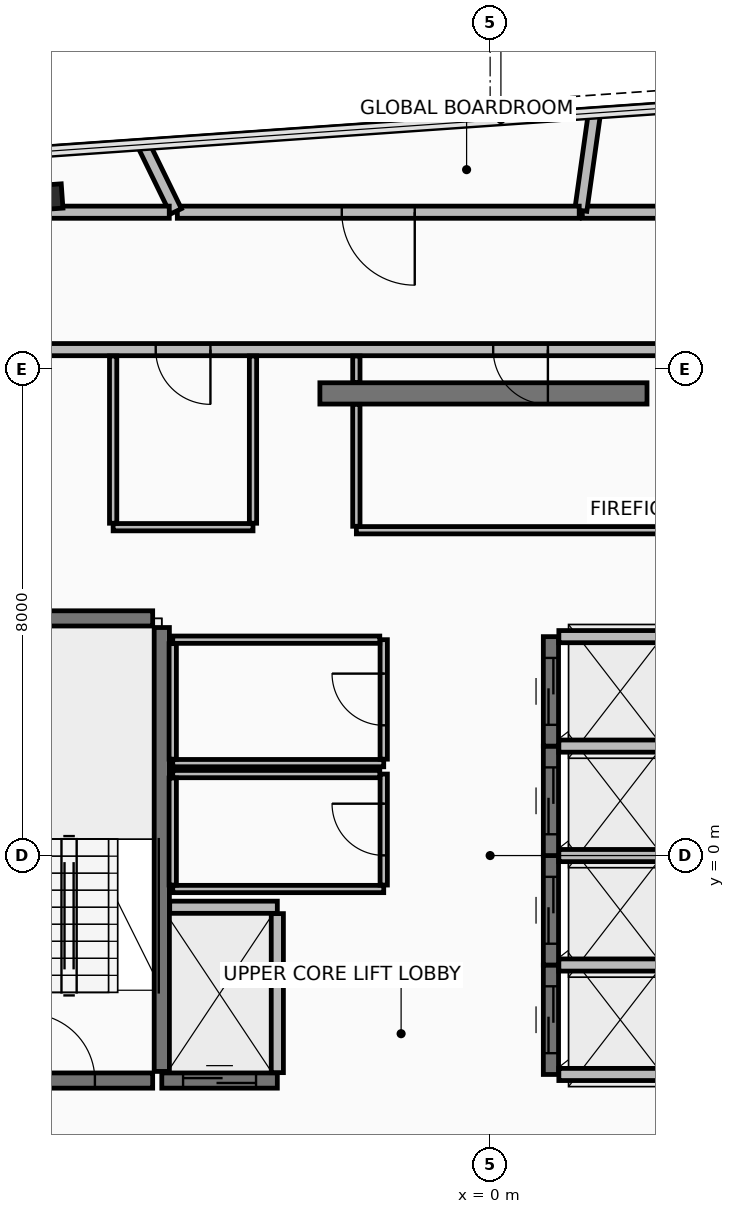
"""IFC4 building model, lengths in metres.
Left out: names, types, materials, properties, quantities, classifications, styles, units other than length and angle.
Written with IfcOpenShell. Run it as: python <this file> out.ifc"""

import sys

from ifc_helpers import new_model, si_unit, direction, frame, frame_2d, origin, origin_2d, place, context, subcontext, project, spatial, rectangle, hollow_rectangle, extrude, element, fill, save


model = new_model("IFC4")
c1 = context("Model", 3, precision=1e-05, world=origin(), true_north=direction((0.0, 1.0)))
c2 = subcontext(c1, "Body", "Model", "MODEL_VIEW")
j1 = project(units=[si_unit("LENGTHUNIT", "METRE"), si_unit("PLANEANGLEUNIT", "RADIAN")], contexts=[c1])
p1 = place(None, origin())
s1 = spatial("IfcSite", under=j1, at=p1, CompositionType="ELEMENT")
p2 = place(p1, origin())
s2 = spatial("IfcBuilding", under=s1, at=p2, CompositionType="ELEMENT")
p3 = place(p2, frame((0.0, 0.0, 260.6)))
s3 = spatial("IfcBuildingStorey", under=s2, at=p3, CompositionType="ELEMENT", Elevation=260.6)
p4 = place(p3, frame((-7.24, 10.833, 0.0), z_axis=(0.0, 0.0, 1.0), x_axis=(0.99756392851, 0.069758214822, 0.0)))
e1 = element("IfcColumn", 1, at=p4, inside=s3, PredefinedType="COLUMN", context=c2, shape_type="SweptSolid", body=[
    extrude(hollow_rectangle(XDim=0.4, YDim=0.4, WallThickness=0.025, at=origin_2d()), origin(), (0.0, 0.0, 1.0), 3.6),
])
p5 = place(p3, frame((-2.8, 7.6, 0.0), z_axis=(0.0, 0.0, 1.0), x_axis=(1.0, 0.0, 0.0)))
e2 = element("IfcWall", 2, at=p5, inside=s3, PredefinedType="SHEAR", context=c2, shape_type="SweptSolid", body=[
    extrude(rectangle(XDim=5.38, YDim=0.35, at=frame_2d((2.69, 0.0))), origin(), (0.0, 0.0, 1.0), 3.42),
])
p6 = place(p3, frame((9.62, 8.32, 0.0), z_axis=(0.0, 0.0, 1.0), x_axis=(-1.0, 0.0, 0.0)))
e3 = element("IfcWall", 3, at=p6, inside=s3, PredefinedType="PARTITIONING", context=c2, shape_type="SweptSolid", body=[
    extrude(rectangle(XDim=19.24, YDim=0.2, at=frame_2d((9.62, 0.0))), origin(), (0.0, 0.0, 1.0), 2.915),
])
p7 = place(p6, frame((8.67, 0.0, 0.0)))
e4 = element("IfcOpeningElement", 4, at=p7, cuts=e3, PredefinedType="OPENING", context=c2, shape_type="SweptSolid", body=[
    extrude(rectangle(XDim=0.9, YDim=2.1, at=frame_2d((0.45, 1.05))), frame((0.0, 0.11, 0.0), z_axis=(0.0, -1.0, 0.0), x_axis=(1.0, 0.0, 0.0)), (0.0, 0.0, 1.0), 0.22),
])
p8 = place(p6, frame((14.22, 0.0, 0.0)))
e5 = element("IfcOpeningElement", 5, at=p8, cuts=e3, PredefinedType="OPENING", context=c2, shape_type="SweptSolid", body=[
    extrude(rectangle(XDim=0.9, YDim=2.1, at=frame_2d((0.45, 1.05))), frame((0.0, 0.11, 0.0), z_axis=(0.0, -1.0, 0.0), x_axis=(1.0, 0.0, 0.0)), (0.0, 0.0, 1.0), 0.22),
])
p9 = place(p3, frame((-5.4, -3.55, 0.0), z_axis=(0.0, 0.0, 1.0), x_axis=(0.0, 1.0, 0.0)))
e6 = element("IfcWall", 6, at=p9, inside=s3, PredefinedType="SHEAR", context=c2, shape_type="SweptSolid", body=[
    extrude(rectangle(XDim=7.3, YDim=0.25, at=frame_2d((3.65, 0.0))), origin(), (0.0, 0.0, 1.0), 3.42),
])
p10 = place(p3, frame((-8.5, -3.7, 0.0), z_axis=(0.0, 0.0, 1.0), x_axis=(1.0, 0.0, 0.0)))
e7 = element("IfcWall", 7, at=p10, inside=s3, PredefinedType="SHEAR", context=c2, shape_type="SweptSolid", body=[
    extrude(rectangle(XDim=2.95, YDim=0.25, at=frame_2d((1.475, 0.0))), origin(), (0.0, 0.0, 1.0), 3.42),
])
p11 = place(p10, frame((0.9, 0.0, 0.0)))
e8 = element("IfcOpeningElement", 8, at=p11, cuts=e7, PredefinedType="OPENING", context=c2, shape_type="SweptSolid", body=[
    extrude(rectangle(XDim=1.1, YDim=2.15, at=frame_2d((0.55, 1.075))), frame((0.0, 0.135, 0.0), z_axis=(0.0, -1.0, 0.0), x_axis=(1.0, 0.0, 0.0)), (0.0, 0.0, 1.0), 0.27),
])
p12 = place(p3, frame((-8.5, 3.9, 0.0), z_axis=(0.0, 0.0, 1.0), x_axis=(1.0, 0.0, 0.0)))
e9 = element("IfcWall", 9, at=p12, inside=s3, PredefinedType="SHEAR", context=c2, shape_type="SweptSolid", body=[
    extrude(rectangle(XDim=2.95, YDim=0.25, at=frame_2d((1.475, 0.0))), origin(), (0.0, 0.0, 1.0), 3.42),
])
p13 = place(p3, frame((1.0, -3.6, 0.0), z_axis=(0.0, 0.0, 1.0), x_axis=(0.0, 1.0, 0.0)))
e10 = element("IfcWall", 10, at=p13, inside=s3, PredefinedType="SHEAR", context=c2, shape_type="SweptSolid", body=[
    extrude(rectangle(XDim=1.8, YDim=0.25, at=frame_2d((0.9, 0.0))), origin(), (0.0, 0.0, 1.0), 3.42),
])
p14 = place(p13, frame((0.35, 0.0, 0.0)))
e11 = element("IfcOpeningElement", 11, at=p14, cuts=e10, PredefinedType="OPENING", context=c2, shape_type="SweptSolid", body=[
    extrude(rectangle(XDim=1.1, YDim=2.2, at=frame_2d((0.55, 1.1))), frame((0.0, 0.135, 0.0), z_axis=(0.0, -1.0, 0.0), x_axis=(1.0, 0.0, 0.0)), (0.0, 0.0, 1.0), 0.27),
])
for number, where, z_axis, x_axis in (
    (12, (1.13, -3.6, 0.0), (0.0, 0.0, 1.0), (1.0, 0.0, 0.0)),
    (13, (1.13, -1.8, 0.0), (0.0, 0.0, 1.0), (1.0, 0.0, 0.0)),
):
    element("IfcWall", number, at=place(p3, frame(where, z_axis=z_axis, x_axis=x_axis)), inside=s3, PredefinedType="PARTITIONING", context=c2, shape_type="SweptSolid", body=[
        extrude(rectangle(XDim=2.045, YDim=0.2, at=frame_2d((1.022, 0.0))), origin(), (0.0, 0.0, 1.0), 3.42),
    ])
p15 = place(p3, frame((1.0, -1.8, 0.0), z_axis=(0.0, 0.0, 1.0), x_axis=(0.0, 1.0, 0.0)))
e14 = element("IfcWall", 14, at=p15, inside=s3, PredefinedType="SHEAR", context=c2, shape_type="SweptSolid", body=[
    extrude(rectangle(XDim=1.8, YDim=0.25, at=frame_2d((0.9, 0.0))), origin(), (0.0, 0.0, 1.0), 3.42),
])
p16 = place(p15, frame((0.35, 0.0, 0.0)))
e15 = element("IfcOpeningElement", 15, at=p16, cuts=e14, PredefinedType="OPENING", context=c2, shape_type="SweptSolid", body=[
    extrude(rectangle(XDim=1.1, YDim=2.2, at=frame_2d((0.55, 1.1))), frame((0.0, 0.135, 0.0), z_axis=(0.0, -1.0, 0.0), x_axis=(1.0, 0.0, 0.0)), (0.0, 0.0, 1.0), 0.27),
])
p17 = place(p3, frame((1.13, 0.0, 0.0), z_axis=(0.0, 0.0, 1.0), x_axis=(1.0, 0.0, 0.0)))
e16 = element("IfcWall", 16, at=p17, inside=s3, PredefinedType="PARTITIONING", context=c2, shape_type="SweptSolid", body=[
    extrude(rectangle(XDim=2.045, YDim=0.2, at=frame_2d((1.022, 0.0))), origin(), (0.0, 0.0, 1.0), 3.42),
])
p18 = place(p3, frame((1.0, 0.0, 0.0), z_axis=(0.0, 0.0, 1.0), x_axis=(0.0, 1.0, 0.0)))
e17 = element("IfcWall", 17, at=p18, inside=s3, PredefinedType="SHEAR", context=c2, shape_type="SweptSolid", body=[
    extrude(rectangle(XDim=1.8, YDim=0.25, at=frame_2d((0.9, 0.0))), origin(), (0.0, 0.0, 1.0), 3.42),
])
p19 = place(p18, frame((0.35, 0.0, 0.0)))
e18 = element("IfcOpeningElement", 18, at=p19, cuts=e17, PredefinedType="OPENING", context=c2, shape_type="SweptSolid", body=[
    extrude(rectangle(XDim=1.1, YDim=2.2, at=frame_2d((0.55, 1.1))), frame((0.0, 0.135, 0.0), z_axis=(0.0, -1.0, 0.0), x_axis=(1.0, 0.0, 0.0)), (0.0, 0.0, 1.0), 0.27),
])
p20 = place(p3, frame((1.13, 1.8, 0.0), z_axis=(0.0, 0.0, 1.0), x_axis=(1.0, 0.0, 0.0)))
e19 = element("IfcWall", 19, at=p20, inside=s3, PredefinedType="PARTITIONING", context=c2, shape_type="SweptSolid", body=[
    extrude(rectangle(XDim=2.045, YDim=0.2, at=frame_2d((1.022, 0.0))), origin(), (0.0, 0.0, 1.0), 3.42),
])
p21 = place(p3, frame((1.0, 1.8, 0.0), z_axis=(0.0, 0.0, 1.0), x_axis=(0.0, 1.0, 0.0)))
e20 = element("IfcWall", 20, at=p21, inside=s3, PredefinedType="SHEAR", context=c2, shape_type="SweptSolid", body=[
    extrude(rectangle(XDim=1.8, YDim=0.25, at=frame_2d((0.9, 0.0))), origin(), (0.0, 0.0, 1.0), 3.42),
])
p22 = place(p21, frame((0.35, 0.0, 0.0)))
e21 = element("IfcOpeningElement", 21, at=p22, cuts=e20, PredefinedType="OPENING", context=c2, shape_type="SweptSolid", body=[
    extrude(rectangle(XDim=1.1, YDim=2.2, at=frame_2d((0.55, 1.1))), frame((0.0, 0.135, 0.0), z_axis=(0.0, -1.0, 0.0), x_axis=(1.0, 0.0, 0.0)), (0.0, 0.0, 1.0), 0.27),
])
p23 = place(p3, frame((1.13, 3.6, 0.0), z_axis=(0.0, 0.0, 1.0), x_axis=(1.0, 0.0, 0.0)))
e22 = element("IfcWall", 22, at=p23, inside=s3, PredefinedType="PARTITIONING", context=c2, shape_type="SweptSolid", body=[
    extrude(rectangle(XDim=2.045, YDim=0.2, at=frame_2d((1.022, 0.0))), origin(), (0.0, 0.0, 1.0), 2.715),
])
p24 = place(p3, frame((-5.4, -3.7, 0.0), z_axis=(0.0, 0.0, 1.0), x_axis=(1.0, 0.0, 0.0)))
e23 = element("IfcWall", 23, at=p24, inside=s3, PredefinedType="SHEAR", context=c2, shape_type="SweptSolid", body=[
    extrude(rectangle(XDim=1.9, YDim=0.25, at=frame_2d((0.95, 0.0))), origin(), (0.0, 0.0, 1.0), 3.42),
])
p25 = place(p24, frame((0.35, 0.0, 0.0)))
e24 = element("IfcOpeningElement", 24, at=p25, cuts=e23, PredefinedType="OPENING", context=c2, shape_type="SweptSolid", body=[
    extrude(rectangle(XDim=1.2, YDim=2.2, at=frame_2d((0.6, 1.1))), frame((0.0, 0.135, 0.0), z_axis=(0.0, -1.0, 0.0), x_axis=(1.0, 0.0, 0.0)), (0.0, 0.0, 1.0), 0.27),
])
p26 = place(p3, frame((-5.27, -0.85, 0.0), z_axis=(0.0, 0.0, 1.0), x_axis=(1.0, 0.0, 0.0)))
e25 = element("IfcWall", 25, at=p26, inside=s3, PredefinedType="PARTITIONING", context=c2, shape_type="SweptSolid", body=[
    extrude(rectangle(XDim=1.77, YDim=0.2, at=frame_2d((0.885, 0.0))), origin(), (0.0, 0.0, 1.0), 3.42),
])
p27 = place(p3, frame((-3.5, -3.57, 0.0), z_axis=(0.0, 0.0, 1.0), x_axis=(0.0, 1.0, 0.0)))
e26 = element("IfcWall", 26, at=p27, inside=s3, PredefinedType="PARTITIONING", context=c2, shape_type="SweptSolid", body=[
    extrude(rectangle(XDim=2.615, YDim=0.2, at=frame_2d((1.308, 0.0))), origin(), (0.0, 0.0, 1.0), 3.42),
])
p28 = place(p3, frame((-5.22, 1.52, 0.0), z_axis=(0.0, 0.0, 1.0), x_axis=(1.0, 0.0, 0.0)))
e27 = element("IfcWall", 27, at=p28, inside=s3, PredefinedType="PARTITIONING", context=c2, shape_type="SweptSolid", body=[
    extrude(rectangle(XDim=3.47, YDim=0.12, at=frame_2d((1.735, 0.0))), origin(), (0.0, 0.0, 1.0), 3.42),
])
p29 = place(p3, frame((-1.75, 1.585, 0.0), z_axis=(0.0, 0.0, 1.0), x_axis=(0.0, 1.0, 0.0)))
e28 = element("IfcWall", 28, at=p29, inside=s3, PredefinedType="PARTITIONING", context=c2, shape_type="SweptSolid", body=[
    extrude(rectangle(XDim=1.965, YDim=0.12, at=frame_2d((0.982, 0.0))), origin(), (0.0, 0.0, 1.0), 3.42),
])
p30 = place(p29, frame((0.557, 0.0, 0.0)))
e29 = element("IfcOpeningElement", 29, at=p30, cuts=e28, PredefinedType="OPENING", context=c2, shape_type="SweptSolid", body=[
    extrude(rectangle(XDim=0.85, YDim=2.1, at=frame_2d((0.425, 1.05))), frame((0.0, 0.07, 0.0), z_axis=(0.0, -1.0, 0.0), x_axis=(1.0, 0.0, 0.0)), (0.0, 0.0, 1.0), 0.14),
])
p31 = place(p3, frame((-1.815, 3.55, 0.0), z_axis=(0.0, 0.0, 1.0), x_axis=(-1.0, 0.0, 0.0)))
e30 = element("IfcWall", 30, at=p31, inside=s3, PredefinedType="PARTITIONING", context=c2, shape_type="SweptSolid", body=[
    extrude(rectangle(XDim=3.405, YDim=0.12, at=frame_2d((1.703, 0.0))), origin(), (0.0, 0.0, 1.0), 3.42),
])
p32 = place(p3, frame((-5.22, 3.485, 0.0), z_axis=(0.0, 0.0, 1.0), x_axis=(0.0, -1.0, 0.0)))
e31 = element("IfcWall", 31, at=p32, inside=s3, PredefinedType="PARTITIONING", context=c2, shape_type="SweptSolid", body=[
    extrude(rectangle(XDim=1.9, YDim=0.12, at=frame_2d((0.95, 0.0))), origin(), (0.0, 0.0, 1.0), 3.42),
])
p33 = place(p3, frame((-5.22, -0.55, 0.0), z_axis=(0.0, 0.0, 1.0), x_axis=(1.0, 0.0, 0.0)))
e32 = element("IfcWall", 32, at=p33, inside=s3, PredefinedType="PARTITIONING", context=c2, shape_type="SweptSolid", body=[
    extrude(rectangle(XDim=3.47, YDim=0.12, at=frame_2d((1.735, 0.0))), origin(), (0.0, 0.0, 1.0), 3.42),
])
p34 = place(p3, frame((-1.75, -0.485, 0.0), z_axis=(0.0, 0.0, 1.0), x_axis=(0.0, 1.0, 0.0)))
e33 = element("IfcWall", 33, at=p34, inside=s3, PredefinedType="PARTITIONING", context=c2, shape_type="SweptSolid", body=[
    extrude(rectangle(XDim=1.825, YDim=0.12, at=frame_2d((0.913, 0.0))), origin(), (0.0, 0.0, 1.0), 3.42),
])
p35 = place(p34, frame((0.488, 0.0, 0.0)))
e34 = element("IfcOpeningElement", 34, at=p35, cuts=e33, PredefinedType="OPENING", context=c2, shape_type="SweptSolid", body=[
    extrude(rectangle(XDim=0.85, YDim=2.1, at=frame_2d((0.425, 1.05))), frame((0.0, 0.07, 0.0), z_axis=(0.0, -1.0, 0.0), x_axis=(1.0, 0.0, 0.0)), (0.0, 0.0, 1.0), 0.14),
])
p36 = place(p3, frame((-1.815, 1.34, 0.0), z_axis=(0.0, 0.0, 1.0), x_axis=(-1.0, 0.0, 0.0)))
e35 = element("IfcWall", 35, at=p36, inside=s3, PredefinedType="PARTITIONING", context=c2, shape_type="SweptSolid", body=[
    extrude(rectangle(XDim=3.405, YDim=0.12, at=frame_2d((1.703, 0.0))), origin(), (0.0, 0.0, 1.0), 3.42),
])
p37 = place(p3, frame((-5.22, 1.275, 0.0), z_axis=(0.0, 0.0, 1.0), x_axis=(0.0, -1.0, 0.0)))
e36 = element("IfcWall", 36, at=p37, inside=s3, PredefinedType="PARTITIONING", context=c2, shape_type="SweptSolid", body=[
    extrude(rectangle(XDim=1.76, YDim=0.12, at=frame_2d((0.88, 0.0))), origin(), (0.0, 0.0, 1.0), 3.42),
])
p38 = place(p3, frame((-2.2, 5.35, 0.0), z_axis=(0.0, 0.0, 1.0), x_axis=(1.0, 0.0, 0.0)))
e37 = element("IfcWall", 37, at=p38, inside=s3, PredefinedType="PARTITIONING", context=c2, shape_type="SweptSolid", body=[
    extrude(rectangle(XDim=5.4, YDim=0.12, at=frame_2d((2.7, 0.0))), origin(), (0.0, 0.0, 1.0), 2.715),
])
p39 = place(p3, frame((-2.2, 8.215, 0.0), z_axis=(0.0, 0.0, 1.0), x_axis=(0.0, -1.0, 0.0)))
e38 = element("IfcWall", 38, at=p39, inside=s3, PredefinedType="PARTITIONING", context=c2, shape_type="SweptSolid", body=[
    extrude(rectangle(XDim=0.435, YDim=0.12, at=frame_2d((0.218, 0.0))), origin(), (0.0, 0.0, 1.0), 2.715),
])
p40 = place(p3, frame((-2.2, 7.42, 0.0), z_axis=(0.0, 0.0, 1.0), x_axis=(0.0, -1.0, 0.0)))
e39 = element("IfcWall", 39, at=p40, inside=s3, PredefinedType="PARTITIONING", context=c2, shape_type="SweptSolid", body=[
    extrude(rectangle(XDim=2.005, YDim=0.12, at=frame_2d((1.002, 0.0))), origin(), (0.0, 0.0, 1.0), 2.715),
])
p41 = place(p3, frame((-6.2, 5.4, 0.0), z_axis=(0.0, 0.0, 1.0), x_axis=(1.0, 0.0, 0.0)))
e40 = element("IfcWall", 40, at=p41, inside=s3, PredefinedType="PARTITIONING", context=c2, shape_type="SweptSolid", body=[
    extrude(rectangle(XDim=2.3, YDim=0.12, at=frame_2d((1.15, 0.0))), origin(), (0.0, 0.0, 1.0), 3.42),
])
for number, where, z_axis, x_axis in (
    (41, (-3.9, 5.465, 0.0), (0.0, 0.0, 1.0), (0.0, 1.0, 0.0)),
    (42, (-6.2, 8.215, 0.0), (0.0, 0.0, 1.0), (0.0, -1.0, 0.0)),
):
    element("IfcWall", number, at=place(p3, frame(where, z_axis=z_axis, x_axis=x_axis)), inside=s3, PredefinedType="PARTITIONING", context=c2, shape_type="SweptSolid", body=[
        extrude(rectangle(XDim=2.75, YDim=0.12, at=frame_2d((1.375, 0.0))), origin(), (0.0, 0.0, 1.0), 2.715),
    ])
p42 = place(p3, frame((7.333, 10.58, 0.0), z_axis=(0.0, 0.0, 1.0), x_axis=(-1.0, 0.0, 0.0)))
e43 = element("IfcWall", 43, at=p42, inside=s3, PredefinedType="PARTITIONING", context=c2, shape_type="SweptSolid", body=[
    extrude(rectangle(XDim=5.817, YDim=0.2, at=frame_2d((2.909, 0.0))), origin(), (0.0, 0.0, 1.0), 3.42),
])
p43 = place(p42, frame((2.409, 0.0, 0.0)))
e44 = element("IfcOpeningElement", 44, at=p43, cuts=e43, PredefinedType="OPENING", context=c2, shape_type="SweptSolid", body=[
    extrude(rectangle(XDim=1.0, YDim=2.15, at=frame_2d((0.5, 1.075))), frame((0.0, 0.11, 0.0), z_axis=(0.0, -1.0, 0.0), x_axis=(1.0, 0.0, 0.0)), (0.0, 0.0, 1.0), 0.22),
])
p44 = place(p3, frame((1.491, 10.608, 0.0), z_axis=(0.0, 0.0, 1.0), x_axis=(0.139154192709, 0.990270725939, 0.0)))
e45 = element("IfcWall", 45, at=p44, inside=s3, PredefinedType="PARTITIONING", context=c2, shape_type="SweptSolid", body=[
    extrude(rectangle(XDim=1.598, YDim=0.2, at=frame_2d((0.799, 0.0))), origin(), (0.0, 0.0, 1.0), 2.765),
])
p45 = place(p3, frame((1.465, 10.58, 0.0), z_axis=(0.0, 0.0, 1.0), x_axis=(-1.0, 0.0, 0.0)))
e46 = element("IfcWall", 46, at=p45, inside=s3, PredefinedType="PARTITIONING", context=c2, shape_type="SweptSolid", body=[
    extrude(rectangle(XDim=6.61, YDim=0.2, at=frame_2d((3.305, 0.0))), origin(), (0.0, 0.0, 1.0), 3.42),
])
p46 = place(p45, frame((2.705, 0.0, 0.0)))
e47 = element("IfcOpeningElement", 47, at=p46, cuts=e46, PredefinedType="OPENING", context=c2, shape_type="SweptSolid", body=[
    extrude(rectangle(XDim=1.2, YDim=2.15, at=frame_2d((0.6, 1.075))), frame((0.0, 0.11, 0.0), z_axis=(0.0, -1.0, 0.0), x_axis=(1.0, 0.0, 0.0)), (0.0, 0.0, 1.0), 0.22),
])
p47 = place(p3, frame((-5.167, 10.594, 0.0), z_axis=(0.0, 0.0, 1.0), x_axis=(-0.438482667622, 0.89873964539, 0.0)))
e48 = element("IfcWall", 48, at=p47, inside=s3, PredefinedType="PARTITIONING", context=c2, shape_type="SweptSolid", body=[
    extrude(rectangle(XDim=1.222, YDim=0.2, at=frame_2d((0.611, 0.0))), origin(), (0.0, 0.0, 1.0), 2.765),
])
p48 = place(p3, frame((-5.277, 10.58, 0.0), z_axis=(0.0, 0.0, 1.0), x_axis=(-1.0, 0.0, 0.0)))
e49 = element("IfcWall", 49, at=p48, inside=s3, PredefinedType="PARTITIONING", context=c2, shape_type="SweptSolid", body=[
    extrude(rectangle(XDim=6.498, YDim=0.2, at=frame_2d((3.249, 0.0))), origin(), (0.0, 0.0, 1.0), 2.765),
])
p49 = place(p48, frame((3.209, 0.0, 0.0)))
e50 = element("IfcOpeningElement", 50, at=p49, cuts=e49, PredefinedType="OPENING", context=c2, shape_type="SweptSolid", body=[
    extrude(rectangle(XDim=1.2, YDim=2.15, at=frame_2d((0.6, 1.075))), frame((0.0, 0.11, 0.0), z_axis=(0.0, -1.0, 0.0), x_axis=(1.0, 0.0, 0.0)), (0.0, 0.0, 1.0), 0.22),
])
p50 = place(p11, origin())
e51 = element("IfcDoor", 51, at=p50, inside=s3, OperationType="SINGLE_SWING_LEFT", PredefinedType="DOOR", context=c2, shape_type="SweptSolid", body=[
    extrude(rectangle(XDim=1.1, YDim=2.15, at=frame_2d((0.55, 1.075))), frame((0.0, 0.025, 0.0), z_axis=(0.0, -1.0, 0.0), x_axis=(1.0, 0.0, 0.0)), (0.0, 0.0, 1.0), 0.05),
])
fill(e8, e51)
p51 = place(p14, origin())
e52 = element("IfcDoor", 52, at=p51, inside=s3, OperationType="SLIDING_TO_LEFT", PredefinedType="DOOR", context=c2, shape_type="SweptSolid", body=[
    extrude(rectangle(XDim=1.1, YDim=2.2, at=frame_2d((0.55, 1.1))), frame((0.0, 0.025, 0.0), z_axis=(0.0, -1.0, 0.0), x_axis=(1.0, 0.0, 0.0)), (0.0, 0.0, 1.0), 0.05),
])
fill(e11, e52)
p52 = place(p16, origin())
e53 = element("IfcDoor", 53, at=p52, inside=s3, OperationType="SLIDING_TO_LEFT", PredefinedType="DOOR", context=c2, shape_type="SweptSolid", body=[
    extrude(rectangle(XDim=1.1, YDim=2.2, at=frame_2d((0.55, 1.1))), frame((0.0, 0.025, 0.0), z_axis=(0.0, -1.0, 0.0), x_axis=(1.0, 0.0, 0.0)), (0.0, 0.0, 1.0), 0.05),
])
fill(e15, e53)
p53 = place(p19, origin())
e54 = element("IfcDoor", 54, at=p53, inside=s3, OperationType="SLIDING_TO_LEFT", PredefinedType="DOOR", context=c2, shape_type="SweptSolid", body=[
    extrude(rectangle(XDim=1.1, YDim=2.2, at=frame_2d((0.55, 1.1))), frame((0.0, 0.025, 0.0), z_axis=(0.0, -1.0, 0.0), x_axis=(1.0, 0.0, 0.0)), (0.0, 0.0, 1.0), 0.05),
])
fill(e18, e54)
p54 = place(p22, origin())
e55 = element("IfcDoor", 55, at=p54, inside=s3, OperationType="SLIDING_TO_LEFT", PredefinedType="DOOR", context=c2, shape_type="SweptSolid", body=[
    extrude(rectangle(XDim=1.1, YDim=2.2, at=frame_2d((0.55, 1.1))), frame((0.0, 0.025, 0.0), z_axis=(0.0, -1.0, 0.0), x_axis=(1.0, 0.0, 0.0)), (0.0, 0.0, 1.0), 0.05),
])
fill(e21, e55)
p55 = place(p25, origin())
e56 = element("IfcDoor", 56, at=p55, inside=s3, OperationType="SLIDING_TO_RIGHT", PredefinedType="DOOR", context=c2, shape_type="SweptSolid", body=[
    extrude(rectangle(XDim=1.2, YDim=2.2, at=frame_2d((0.6, 1.1))), frame((0.0, 0.025, 0.0), z_axis=(0.0, -1.0, 0.0), x_axis=(1.0, 0.0, 0.0)), (0.0, 0.0, 1.0), 0.05),
])
fill(e24, e56)
p56 = place(p30, frame((0.85, 0.0, 0.0), z_axis=(0.0, 0.0, 1.0), x_axis=(-1.0, 0.0, 0.0)))
e57 = element("IfcDoor", 57, at=p56, inside=s3, OperationType="SINGLE_SWING_RIGHT", PredefinedType="DOOR", context=c2, shape_type="SweptSolid", body=[
    extrude(rectangle(XDim=0.85, YDim=2.1, at=frame_2d((0.425, 1.05))), frame((0.0, 0.025, 0.0), z_axis=(0.0, -1.0, 0.0), x_axis=(1.0, 0.0, 0.0)), (0.0, 0.0, 1.0), 0.05),
])
fill(e29, e57)
p57 = place(p35, frame((0.85, 0.0, 0.0), z_axis=(0.0, 0.0, 1.0), x_axis=(-1.0, 0.0, 0.0)))
e58 = element("IfcDoor", 58, at=p57, inside=s3, OperationType="SINGLE_SWING_RIGHT", PredefinedType="DOOR", context=c2, shape_type="SweptSolid", body=[
    extrude(rectangle(XDim=0.85, YDim=2.1, at=frame_2d((0.425, 1.05))), frame((0.0, 0.025, 0.0), z_axis=(0.0, -1.0, 0.0), x_axis=(1.0, 0.0, 0.0)), (0.0, 0.0, 1.0), 0.05),
])
fill(e34, e58)
p58 = place(p7, origin())
e59 = element("IfcDoor", 59, at=p58, inside=s3, OperationType="SINGLE_SWING_LEFT", PredefinedType="DOOR", context=c2, shape_type="SweptSolid", body=[
    extrude(rectangle(XDim=0.9, YDim=2.1, at=frame_2d((0.45, 1.05))), frame((0.0, 0.025, 0.0), z_axis=(0.0, -1.0, 0.0), x_axis=(1.0, 0.0, 0.0)), (0.0, 0.0, 1.0), 0.05),
])
fill(e4, e59)
p59 = place(p8, origin())
e60 = element("IfcDoor", 60, at=p59, inside=s3, OperationType="SINGLE_SWING_LEFT", PredefinedType="DOOR", context=c2, shape_type="SweptSolid", body=[
    extrude(rectangle(XDim=0.9, YDim=2.1, at=frame_2d((0.45, 1.05))), frame((0.0, 0.025, 0.0), z_axis=(0.0, -1.0, 0.0), x_axis=(1.0, 0.0, 0.0)), (0.0, 0.0, 1.0), 0.05),
])
fill(e5, e60)
p60 = place(p46, origin())
e61 = element("IfcDoor", 61, at=p60, inside=s3, OperationType="SINGLE_SWING_LEFT", PredefinedType="DOOR", context=c2, shape_type="SweptSolid", body=[
    extrude(rectangle(XDim=1.2, YDim=2.15, at=frame_2d((0.6, 1.075))), frame((0.0, 0.025, 0.0), z_axis=(0.0, -1.0, 0.0), x_axis=(1.0, 0.0, 0.0)), (0.0, 0.0, 1.0), 0.05),
])
fill(e47, e61)
save(model, sys.argv[1])
